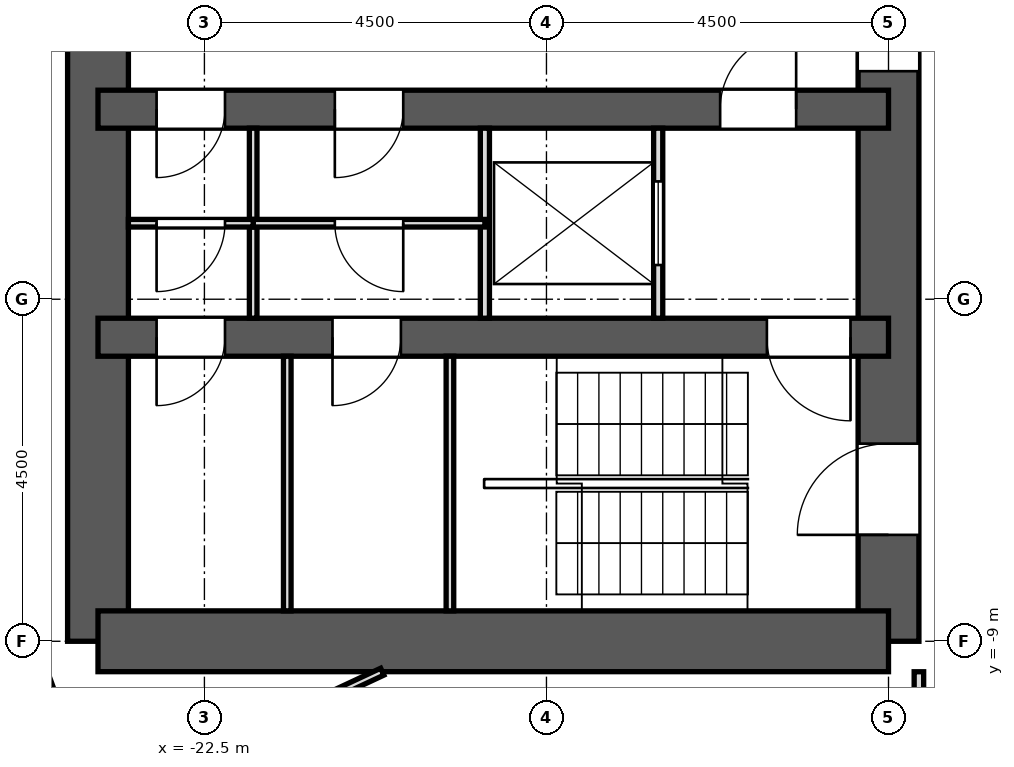
"""IFC4 building model, lengths in metres.
Left out: names, types, materials, properties, quantities, classifications, styles, units other than length and angle.
Written with IfcOpenShell. Run it as: python <this file> out.ifc"""

import sys

from ifc_helpers import new_model, si_unit, direction, frame, frame_2d, origin, place, context, subcontext, project, spatial, rectangle, extrude, element, fill, save


model = new_model("IFC4")
c1 = context("Model", 3, precision=1e-05, world=origin(), true_north=direction((0.0, 1.0)))
c2 = subcontext(c1, "Body", "Model", "MODEL_VIEW")
j1 = project(units=[si_unit("LENGTHUNIT", "METRE"), si_unit("PLANEANGLEUNIT", "RADIAN")], contexts=[c1])
p1 = place(None, origin())
s1 = spatial("IfcSite", under=j1, at=p1, CompositionType="ELEMENT")
p2 = place(p1, origin())
s2 = spatial("IfcBuilding", under=s1, at=p2, CompositionType="ELEMENT")
p3 = place(p2, frame((0.0, 0.0, 101.8)))
s3 = spatial("IfcBuildingStorey", under=s2, at=p3, CompositionType="ELEMENT", Elevation=101.8)
p4 = place(p3, frame((-13.5, -9.0, 0.0), z_axis=(0.0, 0.0, 1.0), x_axis=(0.0, 1.0, 0.0)))
e1 = element("IfcWall", 1, at=p4, inside=s3, PredefinedType="SHEAR", context=c2, shape_type="SweptSolid", body=[
    extrude(rectangle(XDim=18.0, YDim=0.8, at=frame_2d((9.0, 0.0))), origin(), (0.0, 0.0, 1.0), 3.3),
])
p5 = place(p4, frame((15.4, 0.0, 0.0)))
e2 = element("IfcOpeningElement", 2, at=p5, cuts=e1, PredefinedType="OPENING", context=c2, shape_type="SweptSolid", body=[
    extrude(rectangle(XDim=1.2, YDim=2.1, at=frame_2d((0.6, 1.05))), frame((0.0, 0.412, 0.0), z_axis=(0.0, -1.0, 0.0), x_axis=(1.0, 0.0, 0.0)), (0.0, 0.0, 1.0), 0.824),
])
p6 = place(p4, frame((1.4, 0.0, 0.0)))
e3 = element("IfcOpeningElement", 3, at=p6, cuts=e1, PredefinedType="OPENING", context=c2, shape_type="SweptSolid", body=[
    extrude(rectangle(XDim=1.2, YDim=2.1, at=frame_2d((0.6, 1.05))), frame((0.0, 0.412, 0.0), z_axis=(0.0, -1.0, 0.0), x_axis=(1.0, 0.0, 0.0)), (0.0, 0.0, 1.0), 0.824),
])
p7 = place(p4, frame((7.5, 0.0, 0.0)))
e4 = element("IfcOpeningElement", 4, at=p7, cuts=e1, PredefinedType="OPENING", context=c2, shape_type="SweptSolid", body=[
    extrude(rectangle(XDim=3.0, YDim=2.4, at=frame_2d((1.5, 1.2))), frame((0.0, 0.412, 0.0), z_axis=(0.0, -1.0, 0.0), x_axis=(1.0, 0.0, 0.0)), (0.0, 0.0, 1.0), 0.824),
])
p8 = place(p3, frame((-23.9, -9.0, 0.0), z_axis=(0.0, 0.0, 1.0), x_axis=(0.0, 1.0, 0.0)))
e5 = element("IfcWall", 5, at=p8, inside=s3, PredefinedType="SHEAR", context=c2, shape_type="SweptSolid", body=[
    extrude(rectangle(XDim=18.0, YDim=0.8, at=frame_2d((9.0, 0.0))), origin(), (0.0, 0.0, 1.0), 3.3),
])
p9 = place(p3, frame((-13.5, -9.0, 0.0), z_axis=(0.0, 0.0, 1.0), x_axis=(-1.0, 0.0, 0.0)))
e6 = element("IfcWall", 6, at=p9, inside=s3, PredefinedType="SHEAR", context=c2, shape_type="SweptSolid", body=[
    extrude(rectangle(XDim=10.4, YDim=0.8, at=frame_2d((5.2, 0.0))), origin(), (0.0, 0.0, 1.0), 3.3),
])
p10 = place(p3, frame((-13.5, -5.0, 0.0), z_axis=(0.0, 0.0, 1.0), x_axis=(-1.0, 0.0, 0.0)))
e7 = element("IfcWall", 7, at=p10, inside=s3, PredefinedType="SHEAR", context=c2, shape_type="SweptSolid", body=[
    extrude(rectangle(XDim=10.4, YDim=0.5, at=frame_2d((5.2, 0.0))), origin(), (0.0, 0.0, 1.0), 3.3),
])
p11 = place(p10, frame((6.415, 0.0, 0.0)))
e8 = element("IfcOpeningElement", 8, at=p11, cuts=e7, PredefinedType="OPENING", context=c2, shape_type="SweptSolid", body=[
    extrude(rectangle(XDim=0.9, YDim=2.1, at=frame_2d((0.45, 1.05))), frame((0.0, 0.262, 0.0), z_axis=(0.0, -1.0, 0.0), x_axis=(1.0, 0.0, 0.0)), (0.0, 0.0, 1.0), 0.524),
])
p12 = place(p10, frame((8.729, 0.0, 0.0)))
e9 = element("IfcOpeningElement", 9, at=p12, cuts=e7, PredefinedType="OPENING", context=c2, shape_type="SweptSolid", body=[
    extrude(rectangle(XDim=0.9, YDim=2.1, at=frame_2d((0.45, 1.05))), frame((0.0, 0.262, 0.0), z_axis=(0.0, -1.0, 0.0), x_axis=(1.0, 0.0, 0.0)), (0.0, 0.0, 1.0), 0.524),
])
p13 = place(p10, frame((0.5, 0.0, 0.0)))
e10 = element("IfcOpeningElement", 10, at=p13, cuts=e7, PredefinedType="OPENING", context=c2, shape_type="SweptSolid", body=[
    extrude(rectangle(XDim=1.1, YDim=2.1, at=frame_2d((0.55, 1.05))), frame((0.0, 0.262, 0.0), z_axis=(0.0, -1.0, 0.0), x_axis=(1.0, 0.0, 0.0)), (0.0, 0.0, 1.0), 0.524),
])
p14 = place(p3, frame((-13.5, -2.0, 0.0), z_axis=(0.0, 0.0, 1.0), x_axis=(-1.0, 0.0, 0.0)))
e11 = element("IfcWall", 11, at=p14, inside=s3, PredefinedType="SHEAR", context=c2, shape_type="SweptSolid", body=[
    extrude(rectangle(XDim=10.4, YDim=0.5, at=frame_2d((5.2, 0.0))), origin(), (0.0, 0.0, 1.0), 3.3),
])
p15 = place(p14, frame((1.215, 0.0, 0.0)))
e12 = element("IfcOpeningElement", 12, at=p15, cuts=e11, PredefinedType="OPENING", context=c2, shape_type="SweptSolid", body=[
    extrude(rectangle(XDim=1.0, YDim=2.1, at=frame_2d((0.5, 1.05))), frame((0.0, 0.262, 0.0), z_axis=(0.0, -1.0, 0.0), x_axis=(1.0, 0.0, 0.0)), (0.0, 0.0, 1.0), 0.524),
])
p16 = place(p14, frame((6.384, 0.0, 0.0)))
e13 = element("IfcOpeningElement", 13, at=p16, cuts=e11, PredefinedType="OPENING", context=c2, shape_type="SweptSolid", body=[
    extrude(rectangle(XDim=0.9, YDim=2.1, at=frame_2d((0.45, 1.05))), frame((0.0, 0.262, 0.0), z_axis=(0.0, -1.0, 0.0), x_axis=(1.0, 0.0, 0.0)), (0.0, 0.0, 1.0), 0.524),
])
p17 = place(p14, frame((8.729, 0.0, 0.0)))
e14 = element("IfcOpeningElement", 14, at=p17, cuts=e11, PredefinedType="OPENING", context=c2, shape_type="SweptSolid", body=[
    extrude(rectangle(XDim=0.9, YDim=2.1, at=frame_2d((0.45, 1.05))), frame((0.0, 0.262, 0.0), z_axis=(0.0, -1.0, 0.0), x_axis=(1.0, 0.0, 0.0)), (0.0, 0.0, 1.0), 0.524),
])
p18 = place(p3, frame((-25.617, -7.383, 0.0), z_axis=(0.0, 0.0, 1.0), x_axis=(0.341990236633, -0.939703505393, 0.0)))
e15 = element("IfcWall", 15, at=p18, inside=s3, PredefinedType="SOLIDWALL", context=c2, shape_type="SweptSolid", body=[
    extrude(rectangle(XDim=3.648, YDim=0.6, at=frame_2d((1.824, 0.0))), origin(), (0.0, 0.0, 1.0), 2.8),
])
p19 = place(p3, frame((-23.26, -10.847, 0.0), z_axis=(0.0, 0.0, 1.0), x_axis=(0.906121146584, 0.423018282954, 0.0)))
e16 = element("IfcWall", 16, at=p19, inside=s3, PredefinedType="PARTITIONING", context=c2, shape_type="SweptSolid", body=[
    extrude(rectangle(XDim=3.421, YDim=0.1, at=frame_2d((1.711, 0.0))), origin(), (0.0, 0.0, 1.0), 2.8),
])
p20 = place(p3, frame((-13.1, -13.032, 0.0), z_axis=(0.0, 0.0, 1.0), x_axis=(0.0, 1.0, 0.0)))
e17 = element("IfcWall", 17, at=p20, inside=s3, PredefinedType="PARTITIONING", context=c2, shape_type="SweptSolid", body=[
    extrude(rectangle(XDim=3.632, YDim=0.125, at=frame_2d((1.816, 0.0))), origin(), (0.0, 0.0, 1.0), 2.8),
])
p21 = place(p3, frame((-16.53, -4.75, 0.0), z_axis=(0.0, 0.0, 1.0), x_axis=(0.0, 1.0, 0.0)))
e18 = element("IfcWall", 18, at=p21, inside=s3, PredefinedType="PARTITIONING", context=c2, shape_type="SweptSolid", body=[
    extrude(rectangle(XDim=2.5, YDim=0.12, at=frame_2d((1.25, 0.0))), origin(), (0.0, 0.0, 1.0), 2.8),
])
p22 = place(p21, frame((0.7, 0.0, 0.0)))
e19 = element("IfcOpeningElement", 19, at=p22, cuts=e18, PredefinedType="OPENING", context=c2, shape_type="SweptSolid", body=[
    extrude(rectangle(XDim=1.1, YDim=2.1, at=frame_2d((0.55, 1.05))), frame((0.0, 0.072, 0.0), z_axis=(0.0, -1.0, 0.0), x_axis=(1.0, 0.0, 0.0)), (0.0, 0.0, 1.0), 0.144),
])
p23 = place(p3, frame((-18.81, -4.75, 0.0), z_axis=(0.0, 0.0, 1.0), x_axis=(0.0, 1.0, 0.0)))
e20 = element("IfcWall", 20, at=p23, inside=s3, PredefinedType="PARTITIONING", context=c2, shape_type="SweptSolid", body=[
    extrude(rectangle(XDim=2.5, YDim=0.12, at=frame_2d((1.25, 0.0))), origin(), (0.0, 0.0, 1.0), 2.8),
])
p24 = place(p3, frame((-21.858, -4.75, 0.0), z_axis=(0.0, 0.0, 1.0), x_axis=(0.0, 1.0, 0.0)))
e21 = element("IfcWall", 21, at=p24, inside=s3, PredefinedType="PARTITIONING", context=c2, shape_type="SweptSolid", body=[
    extrude(rectangle(XDim=2.5, YDim=0.1, at=frame_2d((1.25, 0.0))), origin(), (0.0, 0.0, 1.0), 2.8),
])
p25 = place(p3, frame((-18.81, -3.5, 0.0), z_axis=(0.0, 0.0, 1.0), x_axis=(-1.0, 0.0, 0.0)))
e22 = element("IfcWall", 22, at=p25, inside=s3, PredefinedType="PARTITIONING", context=c2, shape_type="SweptSolid", body=[
    extrude(rectangle(XDim=3.048, YDim=0.1, at=frame_2d((1.524, 0.0))), origin(), (0.0, 0.0, 1.0), 2.8),
])
p26 = place(p25, frame((1.074, 0.0, 0.0)))
e23 = element("IfcOpeningElement", 23, at=p26, cuts=e22, PredefinedType="OPENING", context=c2, shape_type="SweptSolid", body=[
    extrude(rectangle(XDim=0.9, YDim=2.1, at=frame_2d((0.45, 1.05))), frame((0.0, 0.062, 0.0), z_axis=(0.0, -1.0, 0.0), x_axis=(1.0, 0.0, 0.0)), (0.0, 0.0, 1.0), 0.124),
])
p27 = place(p3, frame((-21.858, -3.5, 0.0), z_axis=(0.0, 0.0, 1.0), x_axis=(-1.0, 0.0, 0.0)))
e24 = element("IfcWall", 24, at=p27, inside=s3, PredefinedType="PARTITIONING", context=c2, shape_type="SweptSolid", body=[
    extrude(rectangle(XDim=1.642, YDim=0.1, at=frame_2d((0.821, 0.0))), origin(), (0.0, 0.0, 1.0), 2.8),
])
p28 = place(p27, frame((0.371, 0.0, 0.0)))
e25 = element("IfcOpeningElement", 25, at=p28, cuts=e24, PredefinedType="OPENING", context=c2, shape_type="SweptSolid", body=[
    extrude(rectangle(XDim=0.9, YDim=2.1, at=frame_2d((0.45, 1.05))), frame((0.0, 0.062, 0.0), z_axis=(0.0, -1.0, 0.0), x_axis=(1.0, 0.0, 0.0)), (0.0, 0.0, 1.0), 0.124),
])
for number, where, z_axis, x_axis in (
    (26, (-19.27, -8.6, 0.0), (0.0, 0.0, 1.0), (0.0, 1.0, 0.0)),
    (27, (-21.41, -8.6, 0.0), (0.0, 0.0, 1.0), (0.0, 1.0, 0.0)),
):
    element("IfcWall", number, at=place(p3, frame(where, z_axis=z_axis, x_axis=x_axis)), inside=s3, PredefinedType="PARTITIONING", context=c2, shape_type="SweptSolid", body=[
        extrude(rectangle(XDim=3.35, YDim=0.1, at=frame_2d((1.675, 0.0))), origin(), (0.0, 0.0, 1.0), 2.8),
    ])
p29 = place(p22, origin())
e28 = element("IfcDoor", 28, at=p29, inside=s3, OperationType="DOUBLE_DOOR_SLIDING", PredefinedType="DOOR", context=c2, shape_type="SweptSolid", body=[
    extrude(rectangle(XDim=1.1, YDim=2.1, at=frame_2d((0.55, 1.05))), frame((0.0, 0.025, 0.0), z_axis=(0.0, -1.0, 0.0), x_axis=(1.0, 0.0, 0.0)), (0.0, 0.0, 1.0), 0.05),
])
fill(e19, e28)
p30 = place(p15, frame((1.0, 0.0, 0.0), z_axis=(0.0, 0.0, 1.0), x_axis=(-1.0, 0.0, 0.0)))
e29 = element("IfcDoor", 29, at=p30, inside=s3, OperationType="SINGLE_SWING_RIGHT", PredefinedType="DOOR", context=c2, shape_type="SweptSolid", body=[
    extrude(rectangle(XDim=1.0, YDim=2.1, at=frame_2d((0.5, 1.05))), frame((0.0, 0.025, 0.0), z_axis=(0.0, -1.0, 0.0), x_axis=(1.0, 0.0, 0.0)), (0.0, 0.0, 1.0), 0.05),
])
fill(e12, e29)
p31 = place(p16, origin())
e30 = element("IfcDoor", 30, at=p31, inside=s3, OperationType="SINGLE_SWING_RIGHT", PredefinedType="DOOR", context=c2, shape_type="SweptSolid", body=[
    extrude(rectangle(XDim=0.9, YDim=2.1, at=frame_2d((0.45, 1.05))), frame((0.0, 0.025, 0.0), z_axis=(0.0, -1.0, 0.0), x_axis=(1.0, 0.0, 0.0)), (0.0, 0.0, 1.0), 0.05),
])
fill(e13, e30)
p32 = place(p17, origin())
e31 = element("IfcDoor", 31, at=p32, inside=s3, OperationType="SINGLE_SWING_RIGHT", PredefinedType="DOOR", context=c2, shape_type="SweptSolid", body=[
    extrude(rectangle(XDim=0.9, YDim=2.1, at=frame_2d((0.45, 1.05))), frame((0.0, 0.025, 0.0), z_axis=(0.0, -1.0, 0.0), x_axis=(1.0, 0.0, 0.0)), (0.0, 0.0, 1.0), 0.05),
])
fill(e14, e31)
p33 = place(p28, origin())
e32 = element("IfcDoor", 32, at=p33, inside=s3, OperationType="SINGLE_SWING_RIGHT", PredefinedType="DOOR", context=c2, shape_type="SweptSolid", body=[
    extrude(rectangle(XDim=0.9, YDim=2.1, at=frame_2d((0.45, 1.05))), frame((0.0, 0.025, 0.0), z_axis=(0.0, -1.0, 0.0), x_axis=(1.0, 0.0, 0.0)), (0.0, 0.0, 1.0), 0.05),
])
fill(e25, e32)
p34 = place(p26, origin())
e33 = element("IfcDoor", 33, at=p34, inside=s3, OperationType="SINGLE_SWING_LEFT", PredefinedType="DOOR", context=c2, shape_type="SweptSolid", body=[
    extrude(rectangle(XDim=0.9, YDim=2.1, at=frame_2d((0.45, 1.05))), frame((0.0, 0.025, 0.0), z_axis=(0.0, -1.0, 0.0), x_axis=(1.0, 0.0, 0.0)), (0.0, 0.0, 1.0), 0.05),
])
fill(e23, e33)
p35 = place(p11, origin())
e34 = element("IfcDoor", 34, at=p35, inside=s3, OperationType="SINGLE_SWING_RIGHT", PredefinedType="DOOR", context=c2, shape_type="SweptSolid", body=[
    extrude(rectangle(XDim=0.9, YDim=2.1, at=frame_2d((0.45, 1.05))), frame((0.0, 0.025, 0.0), z_axis=(0.0, -1.0, 0.0), x_axis=(1.0, 0.0, 0.0)), (0.0, 0.0, 1.0), 0.05),
])
fill(e8, e34)
p36 = place(p12, origin())
e35 = element("IfcDoor", 35, at=p36, inside=s3, OperationType="SINGLE_SWING_RIGHT", PredefinedType="DOOR", context=c2, shape_type="SweptSolid", body=[
    extrude(rectangle(XDim=0.9, YDim=2.1, at=frame_2d((0.45, 1.05))), frame((0.0, 0.025, 0.0), z_axis=(0.0, -1.0, 0.0), x_axis=(1.0, 0.0, 0.0)), (0.0, 0.0, 1.0), 0.05),
])
fill(e9, e35)
p37 = place(p13, origin())
e36 = element("IfcDoor", 36, at=p37, inside=s3, OperationType="SINGLE_SWING_LEFT", PredefinedType="DOOR", context=c2, shape_type="SweptSolid", body=[
    extrude(rectangle(XDim=1.1, YDim=2.1, at=frame_2d((0.55, 1.05))), frame((0.0, 0.025, 0.0), z_axis=(0.0, -1.0, 0.0), x_axis=(1.0, 0.0, 0.0)), (0.0, 0.0, 1.0), 0.05),
])
fill(e10, e36)
p38 = place(p6, origin())
e37 = element("IfcDoor", 37, at=p38, inside=s3, OperationType="SINGLE_SWING_LEFT", PredefinedType="DOOR", context=c2, shape_type="SweptSolid", body=[
    extrude(rectangle(XDim=1.2, YDim=2.1, at=frame_2d((0.6, 1.05))), frame((0.0, 0.025, 0.0), z_axis=(0.0, -1.0, 0.0), x_axis=(1.0, 0.0, 0.0)), (0.0, 0.0, 1.0), 0.05),
])
fill(e3, e37)
p39 = place(p7, origin())
e38 = element("IfcDoor", 38, at=p39, inside=s3, OperationType="DOUBLE_DOOR_SLIDING", PredefinedType="DOOR", context=c2, shape_type="SweptSolid", body=[
    extrude(rectangle(XDim=3.0, YDim=2.4, at=frame_2d((1.5, 1.2))), frame((0.0, 0.025, 0.0), z_axis=(0.0, -1.0, 0.0), x_axis=(1.0, 0.0, 0.0)), (0.0, 0.0, 1.0), 0.05),
])
fill(e4, e38)
save(model, sys.argv[1])
